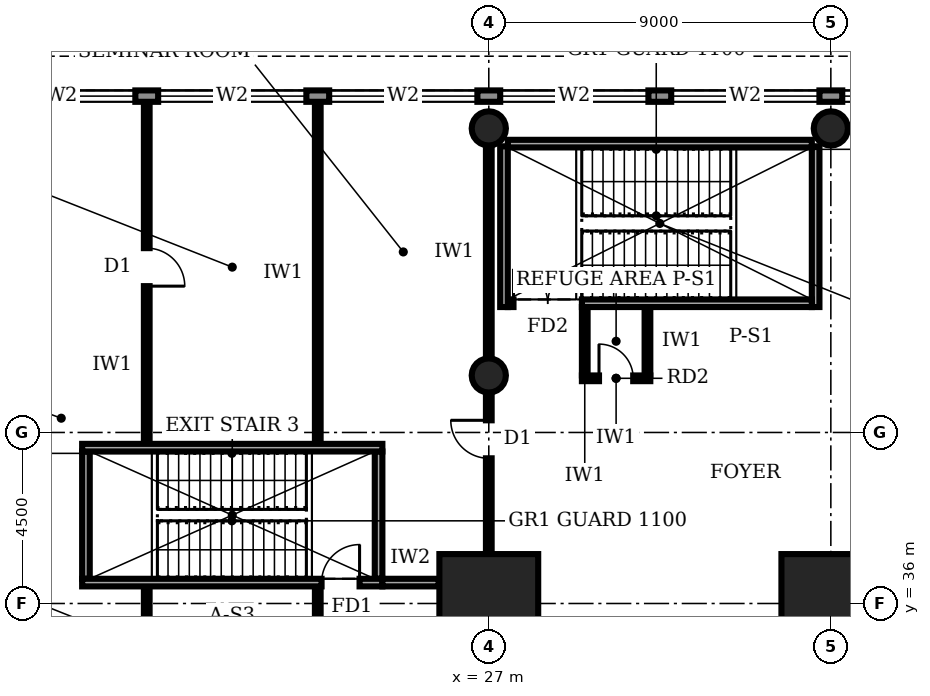
"""IFC4 building model, lengths in metres.
Left out: names, types, materials, properties, quantities, classifications, styles, units other than length and angle.
Written with IfcOpenShell. Run it as: python <this file> out.ifc"""

import sys

from ifc_helpers import new_model, si_unit, direction, frame, frame_2d, origin, origin_2d, place, context, subcontext, project, spatial, rectangle, circle, extrude, element, fill, save


model = new_model("IFC4")
c1 = context("Model", 3, precision=1e-05, world=origin(), true_north=direction((0.0, 1.0)))
c2 = subcontext(c1, "Body", "Model", "MODEL_VIEW")
j1 = project(units=[si_unit("LENGTHUNIT", "METRE"), si_unit("PLANEANGLEUNIT", "RADIAN")], contexts=[c1])
p1 = place(None, origin())
s1 = spatial("IfcSite", under=j1, at=p1, CompositionType="ELEMENT")
p2 = place(p1, origin())
s2 = spatial("IfcBuilding", under=s1, at=p2, CompositionType="ELEMENT")
p3 = place(p2, frame((0.0, 0.0, 6.0)))
s3 = spatial("IfcBuildingStorey", under=s2, at=p3, CompositionType="ELEMENT", Elevation=6.0)
for number, where, z_axis, x_axis in (
    (1, (27.0, 36.0, 0.0), (0.0, 0.0, 1.0), (1.0, 0.0, 0.0)),
    (2, (36.0, 36.0, 0.0), (0.0, 0.0, 1.0), (1.0, 0.0, 0.0)),
):
    element("IfcColumn", number, at=place(p3, frame(where, z_axis=z_axis, x_axis=x_axis)), inside=s3, PredefinedType="COLUMN", context=c2, shape_type="SweptSolid", body=[
        extrude(rectangle(XDim=2.6, YDim=2.6, at=origin_2d()), origin(), (0.0, 0.0, 1.0), 5.0),
    ])
for number, where, z_axis, x_axis in (
    (3, (27.0, 42.0, 0.0), (0.0, 0.0, 1.0), (1.0, 0.0, 0.0)),
    (4, (27.0, 48.5, 0.0), (0.0, 0.0, 1.0), (1.0, 0.0, 0.0)),
    (5, (36.0, 48.5, 0.0), (0.0, 0.0, 1.0), (1.0, 0.0, 0.0)),
):
    element("IfcColumn", number, at=place(p3, frame(where, z_axis=z_axis, x_axis=x_axis)), inside=s3, PredefinedType="COLUMN", context=c2, shape_type="SweptSolid", body=[
        extrude(circle(Radius=0.45, at=origin_2d()), origin(), (0.0, 0.0, 1.0), 5.0),
    ])
p4 = place(p3, frame((98.98, 49.35, 0.0), z_axis=(0.0, 0.0, 1.0), x_axis=(-1.0, 0.0, 0.0)))
e6 = element("IfcWall", 6, at=p4, inside=s3, PredefinedType="STANDARD", context=c2, shape_type="SweptSolid", body=[
    extrude(rectangle(XDim=98.96, YDim=0.3, at=frame_2d((49.48, 0.0))), origin(), (0.0, 0.0, 1.0), 4.7),
])
p5 = place(p4, frame((94.78, 0.0, 0.6)))
e7 = element("IfcOpeningElement", 7, at=p5, cuts=e6, PredefinedType="OPENING", context=c2, shape_type="SweptSolid", body=[
    extrude(rectangle(XDim=3.9, YDim=2.6, at=frame_2d((1.95, 1.3))), frame((0.0, 0.16, 0.0), z_axis=(0.0, -1.0, 0.0), x_axis=(1.0, 0.0, 0.0)), (0.0, 0.0, 1.0), 0.32),
])
p6 = place(p4, frame((90.28, 0.0, 0.6)))
e8 = element("IfcOpeningElement", 8, at=p6, cuts=e6, PredefinedType="OPENING", context=c2, shape_type="SweptSolid", body=[
    extrude(rectangle(XDim=3.9, YDim=2.6, at=frame_2d((1.95, 1.3))), frame((0.0, 0.16, 0.0), z_axis=(0.0, -1.0, 0.0), x_axis=(1.0, 0.0, 0.0)), (0.0, 0.0, 1.0), 0.32),
])
p7 = place(p4, frame((85.78, 0.0, 0.6)))
e9 = element("IfcOpeningElement", 9, at=p7, cuts=e6, PredefinedType="OPENING", context=c2, shape_type="SweptSolid", body=[
    extrude(rectangle(XDim=3.9, YDim=2.6, at=frame_2d((1.95, 1.3))), frame((0.0, 0.16, 0.0), z_axis=(0.0, -1.0, 0.0), x_axis=(1.0, 0.0, 0.0)), (0.0, 0.0, 1.0), 0.32),
])
p8 = place(p4, frame((81.28, 0.0, 0.6)))
e10 = element("IfcOpeningElement", 10, at=p8, cuts=e6, PredefinedType="OPENING", context=c2, shape_type="SweptSolid", body=[
    extrude(rectangle(XDim=3.9, YDim=2.6, at=frame_2d((1.95, 1.3))), frame((0.0, 0.16, 0.0), z_axis=(0.0, -1.0, 0.0), x_axis=(1.0, 0.0, 0.0)), (0.0, 0.0, 1.0), 0.32),
])
p9 = place(p4, frame((76.78, 0.0, 0.6)))
e11 = element("IfcOpeningElement", 11, at=p9, cuts=e6, PredefinedType="OPENING", context=c2, shape_type="SweptSolid", body=[
    extrude(rectangle(XDim=3.9, YDim=2.6, at=frame_2d((1.95, 1.3))), frame((0.0, 0.16, 0.0), z_axis=(0.0, -1.0, 0.0), x_axis=(1.0, 0.0, 0.0)), (0.0, 0.0, 1.0), 0.32),
])
p10 = place(p4, frame((72.28, 0.0, 0.6)))
e12 = element("IfcOpeningElement", 12, at=p10, cuts=e6, PredefinedType="OPENING", context=c2, shape_type="SweptSolid", body=[
    extrude(rectangle(XDim=3.9, YDim=2.6, at=frame_2d((1.95, 1.3))), frame((0.0, 0.16, 0.0), z_axis=(0.0, -1.0, 0.0), x_axis=(1.0, 0.0, 0.0)), (0.0, 0.0, 1.0), 0.32),
])
p11 = place(p4, frame((67.78, 0.0, 0.6)))
e13 = element("IfcOpeningElement", 13, at=p11, cuts=e6, PredefinedType="OPENING", context=c2, shape_type="SweptSolid", body=[
    extrude(rectangle(XDim=3.9, YDim=2.6, at=frame_2d((1.95, 1.3))), frame((0.0, 0.16, 0.0), z_axis=(0.0, -1.0, 0.0), x_axis=(1.0, 0.0, 0.0)), (0.0, 0.0, 1.0), 0.32),
])
p12 = place(p4, frame((63.28, 0.0, 0.6)))
e14 = element("IfcOpeningElement", 14, at=p12, cuts=e6, PredefinedType="OPENING", context=c2, shape_type="SweptSolid", body=[
    extrude(rectangle(XDim=3.9, YDim=2.6, at=frame_2d((1.95, 1.3))), frame((0.0, 0.16, 0.0), z_axis=(0.0, -1.0, 0.0), x_axis=(1.0, 0.0, 0.0)), (0.0, 0.0, 1.0), 0.32),
])
p13 = place(p4, frame((58.78, 0.0, 0.6)))
e15 = element("IfcOpeningElement", 15, at=p13, cuts=e6, PredefinedType="OPENING", context=c2, shape_type="SweptSolid", body=[
    extrude(rectangle(XDim=3.9, YDim=2.6, at=frame_2d((1.95, 1.3))), frame((0.0, 0.16, 0.0), z_axis=(0.0, -1.0, 0.0), x_axis=(1.0, 0.0, 0.0)), (0.0, 0.0, 1.0), 0.32),
])
p14 = place(p4, frame((54.28, 0.0, 0.6)))
e16 = element("IfcOpeningElement", 16, at=p14, cuts=e6, PredefinedType="OPENING", context=c2, shape_type="SweptSolid", body=[
    extrude(rectangle(XDim=3.9, YDim=2.6, at=frame_2d((1.95, 1.3))), frame((0.0, 0.16, 0.0), z_axis=(0.0, -1.0, 0.0), x_axis=(1.0, 0.0, 0.0)), (0.0, 0.0, 1.0), 0.32),
])
p15 = place(p4, frame((49.78, 0.0, 0.6)))
e17 = element("IfcOpeningElement", 17, at=p15, cuts=e6, PredefinedType="OPENING", context=c2, shape_type="SweptSolid", body=[
    extrude(rectangle(XDim=3.9, YDim=2.6, at=frame_2d((1.95, 1.3))), frame((0.0, 0.16, 0.0), z_axis=(0.0, -1.0, 0.0), x_axis=(1.0, 0.0, 0.0)), (0.0, 0.0, 1.0), 0.32),
])
p16 = place(p4, frame((45.28, 0.0, 0.6)))
e18 = element("IfcOpeningElement", 18, at=p16, cuts=e6, PredefinedType="OPENING", context=c2, shape_type="SweptSolid", body=[
    extrude(rectangle(XDim=3.9, YDim=2.6, at=frame_2d((1.95, 1.3))), frame((0.0, 0.16, 0.0), z_axis=(0.0, -1.0, 0.0), x_axis=(1.0, 0.0, 0.0)), (0.0, 0.0, 1.0), 0.32),
])
p17 = place(p4, frame((40.78, 0.0, 0.6)))
e19 = element("IfcOpeningElement", 19, at=p17, cuts=e6, PredefinedType="OPENING", context=c2, shape_type="SweptSolid", body=[
    extrude(rectangle(XDim=3.9, YDim=2.6, at=frame_2d((1.95, 1.3))), frame((0.0, 0.16, 0.0), z_axis=(0.0, -1.0, 0.0), x_axis=(1.0, 0.0, 0.0)), (0.0, 0.0, 1.0), 0.32),
])
p18 = place(p4, frame((36.28, 0.0, 0.6)))
e20 = element("IfcOpeningElement", 20, at=p18, cuts=e6, PredefinedType="OPENING", context=c2, shape_type="SweptSolid", body=[
    extrude(rectangle(XDim=3.9, YDim=2.6, at=frame_2d((1.95, 1.3))), frame((0.0, 0.16, 0.0), z_axis=(0.0, -1.0, 0.0), x_axis=(1.0, 0.0, 0.0)), (0.0, 0.0, 1.0), 0.32),
])
p19 = place(p4, frame((31.78, 0.0, 0.6)))
e21 = element("IfcOpeningElement", 21, at=p19, cuts=e6, PredefinedType="OPENING", context=c2, shape_type="SweptSolid", body=[
    extrude(rectangle(XDim=3.9, YDim=2.6, at=frame_2d((1.95, 1.3))), frame((0.0, 0.16, 0.0), z_axis=(0.0, -1.0, 0.0), x_axis=(1.0, 0.0, 0.0)), (0.0, 0.0, 1.0), 0.32),
])
p20 = place(p4, frame((27.28, 0.0, 0.6)))
e22 = element("IfcOpeningElement", 22, at=p20, cuts=e6, PredefinedType="OPENING", context=c2, shape_type="SweptSolid", body=[
    extrude(rectangle(XDim=3.9, YDim=2.6, at=frame_2d((1.95, 1.3))), frame((0.0, 0.16, 0.0), z_axis=(0.0, -1.0, 0.0), x_axis=(1.0, 0.0, 0.0)), (0.0, 0.0, 1.0), 0.32),
])
p21 = place(p4, frame((22.78, 0.0, 0.6)))
e23 = element("IfcOpeningElement", 23, at=p21, cuts=e6, PredefinedType="OPENING", context=c2, shape_type="SweptSolid", body=[
    extrude(rectangle(XDim=3.9, YDim=2.6, at=frame_2d((1.95, 1.3))), frame((0.0, 0.16, 0.0), z_axis=(0.0, -1.0, 0.0), x_axis=(1.0, 0.0, 0.0)), (0.0, 0.0, 1.0), 0.32),
])
p22 = place(p4, frame((18.28, 0.0, 0.6)))
e24 = element("IfcOpeningElement", 24, at=p22, cuts=e6, PredefinedType="OPENING", context=c2, shape_type="SweptSolid", body=[
    extrude(rectangle(XDim=3.9, YDim=2.6, at=frame_2d((1.95, 1.3))), frame((0.0, 0.16, 0.0), z_axis=(0.0, -1.0, 0.0), x_axis=(1.0, 0.0, 0.0)), (0.0, 0.0, 1.0), 0.32),
])
p23 = place(p4, frame((13.78, 0.0, 0.6)))
e25 = element("IfcOpeningElement", 25, at=p23, cuts=e6, PredefinedType="OPENING", context=c2, shape_type="SweptSolid", body=[
    extrude(rectangle(XDim=3.9, YDim=2.6, at=frame_2d((1.95, 1.3))), frame((0.0, 0.16, 0.0), z_axis=(0.0, -1.0, 0.0), x_axis=(1.0, 0.0, 0.0)), (0.0, 0.0, 1.0), 0.32),
])
p24 = place(p4, frame((9.28, 0.0, 0.6)))
e26 = element("IfcOpeningElement", 26, at=p24, cuts=e6, PredefinedType="OPENING", context=c2, shape_type="SweptSolid", body=[
    extrude(rectangle(XDim=3.9, YDim=2.6, at=frame_2d((1.95, 1.3))), frame((0.0, 0.16, 0.0), z_axis=(0.0, -1.0, 0.0), x_axis=(1.0, 0.0, 0.0)), (0.0, 0.0, 1.0), 0.32),
])
p25 = place(p4, frame((4.78, 0.0, 0.6)))
e27 = element("IfcOpeningElement", 27, at=p25, cuts=e6, PredefinedType="OPENING", context=c2, shape_type="SweptSolid", body=[
    extrude(rectangle(XDim=3.9, YDim=2.6, at=frame_2d((1.95, 1.3))), frame((0.0, 0.16, 0.0), z_axis=(0.0, -1.0, 0.0), x_axis=(1.0, 0.0, 0.0)), (0.0, 0.0, 1.0), 0.32),
])
p26 = place(p3, frame((18.0, 31.5, 0.0), z_axis=(0.0, 0.0, 1.0), x_axis=(0.0, 1.0, 0.0)))
e28 = element("IfcWall", 28, at=p26, inside=s3, PredefinedType="PARTITIONING", context=c2, shape_type="SweptSolid", body=[
    extrude(rectangle(XDim=4.95, YDim=0.15, at=frame_2d((2.475, 0.0))), origin(), (0.0, 0.0, 1.0), 4.7),
])
p27 = place(p3, frame((18.0, 40.2, 0.0), z_axis=(0.0, 0.0, 1.0), x_axis=(0.0, 1.0, 0.0)))
e29 = element("IfcWall", 29, at=p27, inside=s3, PredefinedType="PARTITIONING", context=c2, shape_type="SweptSolid", body=[
    extrude(rectangle(XDim=9.0, YDim=0.15, at=frame_2d((4.5, 0.0))), origin(), (0.0, 0.0, 1.0), 4.7),
])
p28 = place(p27, frame((4.15, 0.0, 0.0)))
e30 = element("IfcOpeningElement", 30, at=p28, cuts=e29, PredefinedType="OPENING", context=c2, shape_type="SweptSolid", body=[
    extrude(rectangle(XDim=1.0, YDim=2.1, at=frame_2d((0.5, 1.05))), frame((0.0, 0.085, 0.0), z_axis=(0.0, -1.0, 0.0), x_axis=(1.0, 0.0, 0.0)), (0.0, 0.0, 1.0), 0.17),
])
p29 = place(p3, frame((22.5, 31.5, 0.0), z_axis=(0.0, 0.0, 1.0), x_axis=(0.0, 1.0, 0.0)))
e31 = element("IfcWall", 31, at=p29, inside=s3, PredefinedType="PARTITIONING", context=c2, shape_type="SweptSolid", body=[
    extrude(rectangle(XDim=4.95, YDim=0.15, at=frame_2d((2.475, 0.0))), origin(), (0.0, 0.0, 1.0), 4.7),
])
p30 = place(p3, frame((22.5, 40.2, 0.0), z_axis=(0.0, 0.0, 1.0), x_axis=(0.0, 1.0, 0.0)))
e32 = element("IfcWall", 32, at=p30, inside=s3, PredefinedType="PARTITIONING", context=c2, shape_type="SweptSolid", body=[
    extrude(rectangle(XDim=9.0, YDim=0.15, at=frame_2d((4.5, 0.0))), origin(), (0.0, 0.0, 1.0), 4.7),
])
p31 = place(p3, frame((27.0, 37.32, 0.0), z_axis=(0.0, 0.0, 1.0), x_axis=(0.0, 1.0, 0.0)))
e33 = element("IfcWall", 33, at=p31, inside=s3, PredefinedType="PARTITIONING", context=c2, shape_type="SweptSolid", body=[
    extrude(rectangle(XDim=4.21, YDim=0.15, at=frame_2d((2.105, 0.0))), origin(), (0.0, 0.0, 1.0), 3.7),
])
p32 = place(p31, frame((2.5, 0.0, 0.0)))
e34 = element("IfcOpeningElement", 34, at=p32, cuts=e33, PredefinedType="OPENING", context=c2, shape_type="SweptSolid", body=[
    extrude(rectangle(XDim=1.0, YDim=2.1, at=frame_2d((0.5, 1.05))), frame((0.0, 0.085, 0.0), z_axis=(0.0, -1.0, 0.0), x_axis=(1.0, 0.0, 0.0)), (0.0, 0.0, 1.0), 0.17),
])
p33 = place(p3, frame((27.0, 42.47, 0.0), z_axis=(0.0, 0.0, 1.0), x_axis=(0.0, 1.0, 0.0)))
e35 = element("IfcWall", 35, at=p33, inside=s3, PredefinedType="PARTITIONING", context=c2, shape_type="SweptSolid", body=[
    extrude(rectangle(XDim=5.56, YDim=0.15, at=frame_2d((2.78, 0.0))), origin(), (0.0, 0.0, 1.0), 3.7),
])
p34 = place(p3, frame((27.5, 43.9, 0.0), z_axis=(0.0, 0.0, 1.0), x_axis=(1.0, 0.0, 0.0)))
e36 = element("IfcWall", 36, at=p34, inside=s3, PredefinedType="SOLIDWALL", context=c2, shape_type="SweptSolid", body=[
    extrude(rectangle(XDim=8.0, YDim=0.2, at=frame_2d((4.0, 0.0))), origin(), (0.0, 0.0, 1.0), 4.7),
])
p35 = place(p34, frame((0.15, 0.0, 0.0)))
e37 = element("IfcOpeningElement", 37, at=p35, cuts=e36, PredefinedType="OPENING", context=c2, shape_type="SweptSolid", body=[
    extrude(rectangle(XDim=1.8, YDim=2.1, at=frame_2d((0.9, 1.05))), frame((0.0, 0.11, 0.0), z_axis=(0.0, -1.0, 0.0), x_axis=(1.0, 0.0, 0.0)), (0.0, 0.0, 1.0), 0.22),
])
p36 = place(p3, frame((27.5, 48.1, 0.0), z_axis=(0.0, 0.0, 1.0), x_axis=(1.0, 0.0, 0.0)))
e38 = element("IfcWall", 38, at=p36, inside=s3, PredefinedType="SOLIDWALL", context=c2, shape_type="SweptSolid", body=[
    extrude(rectangle(XDim=8.0, YDim=0.2, at=frame_2d((4.0, 0.0))), origin(), (0.0, 0.0, 1.0), 4.7),
])
for number, where, z_axis, x_axis in (
    (39, (27.4, 43.8, 0.0), (0.0, 0.0, 1.0), (0.0, 1.0, 0.0)),
    (40, (35.6, 43.8, 0.0), (0.0, 0.0, 1.0), (0.0, 1.0, 0.0)),
):
    element("IfcWall", number, at=place(p3, frame(where, z_axis=z_axis, x_axis=x_axis)), inside=s3, PredefinedType="SOLIDWALL", context=c2, shape_type="SweptSolid", body=[
        extrude(rectangle(XDim=4.23, YDim=0.2, at=frame_2d((2.115, 0.0))), origin(), (0.0, 0.0, 1.0), 4.7),
    ])
p37 = place(p3, frame((24.2, 36.55, 0.0), z_axis=(0.0, 0.0, 1.0), x_axis=(1.0, 0.0, 0.0)))
e41 = element("IfcWall", 41, at=p37, inside=s3, PredefinedType="SOLIDWALL", context=c2, shape_type="SweptSolid", body=[
    extrude(rectangle(XDim=1.48, YDim=0.2, at=frame_2d((0.74, 0.0))), origin(), (0.0, 0.0, 1.0), 4.7),
])
p38 = place(p3, frame((16.3, 36.55, 0.0), z_axis=(0.0, 0.0, 1.0), x_axis=(1.0, 0.0, 0.0)))
e42 = element("IfcWall", 42, at=p38, inside=s3, PredefinedType="SOLIDWALL", context=c2, shape_type="SweptSolid", body=[
    extrude(rectangle(XDim=7.9, YDim=0.2, at=frame_2d((3.95, 0.0))), origin(), (0.0, 0.0, 1.0), 4.7),
])
p39 = place(p38, frame((6.3, 0.0, 0.0)))
e43 = element("IfcOpeningElement", 43, at=p39, cuts=e42, PredefinedType="OPENING", context=c2, shape_type="SweptSolid", body=[
    extrude(rectangle(XDim=1.0, YDim=2.1, at=frame_2d((0.5, 1.05))), frame((0.0, 0.11, 0.0), z_axis=(0.0, -1.0, 0.0), x_axis=(1.0, 0.0, 0.0)), (0.0, 0.0, 1.0), 0.22),
])
p40 = place(p3, frame((16.3, 40.1, 0.0), z_axis=(0.0, 0.0, 1.0), x_axis=(1.0, 0.0, 0.0)))
e44 = element("IfcWall", 44, at=p40, inside=s3, PredefinedType="SOLIDWALL", context=c2, shape_type="SweptSolid", body=[
    extrude(rectangle(XDim=7.9, YDim=0.2, at=frame_2d((3.95, 0.0))), origin(), (0.0, 0.0, 1.0), 4.7),
])
for number, where, z_axis, x_axis in (
    (45, (16.4, 36.65, 0.0), (0.0, 0.0, 1.0), (0.0, 1.0, 0.0)),
    (46, (24.1, 36.65, 0.0), (0.0, 0.0, 1.0), (0.0, 1.0, 0.0)),
):
    element("IfcWall", number, at=place(p3, frame(where, z_axis=z_axis, x_axis=x_axis)), inside=s3, PredefinedType="SOLIDWALL", context=c2, shape_type="SweptSolid", body=[
        extrude(rectangle(XDim=3.35, YDim=0.2, at=frame_2d((1.675, 0.0))), origin(), (0.0, 0.0, 1.0), 4.7),
    ])
p41 = place(p3, frame((31.175, 42.0, 0.0), z_axis=(0.0, 0.0, 1.0), x_axis=(0.0, 1.0, 0.0)))
e47 = element("IfcWall", 47, at=p41, inside=s3, PredefinedType="PARTITIONING", context=c2, shape_type="SweptSolid", body=[
    extrude(rectangle(XDim=1.8, YDim=0.15, at=frame_2d((0.9, 0.0))), origin(), (0.0, 0.0, 1.0), 4.7),
])
p42 = place(p3, frame((29.45, 41.925, 0.0), z_axis=(0.0, 0.0, 1.0), x_axis=(1.0, 0.0, 0.0)))
e48 = element("IfcWall", 48, at=p42, inside=s3, PredefinedType="PARTITIONING", context=c2, shape_type="SweptSolid", body=[
    extrude(rectangle(XDim=1.8, YDim=0.15, at=frame_2d((0.9, 0.0))), origin(), (0.0, 0.0, 1.0), 4.7),
])
p43 = place(p42, frame((0.45, 0.0, 0.0)))
e49 = element("IfcOpeningElement", 49, at=p43, cuts=e48, PredefinedType="OPENING", context=c2, shape_type="SweptSolid", body=[
    extrude(rectangle(XDim=0.9, YDim=2.1, at=frame_2d((0.45, 1.05))), frame((0.0, 0.085, 0.0), z_axis=(0.0, -1.0, 0.0), x_axis=(1.0, 0.0, 0.0)), (0.0, 0.0, 1.0), 0.17),
])
p44 = place(p3, frame((29.525, 42.0, 0.0), z_axis=(0.0, 0.0, 1.0), x_axis=(0.0, 1.0, 0.0)))
e50 = element("IfcWall", 50, at=p44, inside=s3, PredefinedType="PARTITIONING", context=c2, shape_type="SweptSolid", body=[
    extrude(rectangle(XDim=1.8, YDim=0.15, at=frame_2d((0.9, 0.0))), origin(), (0.0, 0.0, 1.0), 4.7),
])
p45 = place(p8, origin())
e51 = element("IfcWindow", 51, at=p45, inside=s3, PartitioningType="SINGLE_PANEL", PredefinedType="WINDOW", context=c2, shape_type="SweptSolid", body=[
    extrude(rectangle(XDim=3.9, YDim=2.6, at=frame_2d((1.95, 1.3))), frame((0.0, 0.03, 0.0), z_axis=(0.0, -1.0, 0.0), x_axis=(1.0, 0.0, 0.0)), (0.0, 0.0, 1.0), 0.06),
])
fill(e10, e51)
p46 = place(p9, origin())
e52 = element("IfcWindow", 52, at=p46, inside=s3, PartitioningType="SINGLE_PANEL", PredefinedType="WINDOW", context=c2, shape_type="SweptSolid", body=[
    extrude(rectangle(XDim=3.9, YDim=2.6, at=frame_2d((1.95, 1.3))), frame((0.0, 0.03, 0.0), z_axis=(0.0, -1.0, 0.0), x_axis=(1.0, 0.0, 0.0)), (0.0, 0.0, 1.0), 0.06),
])
fill(e11, e52)
p47 = place(p10, origin())
e53 = element("IfcWindow", 53, at=p47, inside=s3, PartitioningType="SINGLE_PANEL", PredefinedType="WINDOW", context=c2, shape_type="SweptSolid", body=[
    extrude(rectangle(XDim=3.9, YDim=2.6, at=frame_2d((1.95, 1.3))), frame((0.0, 0.03, 0.0), z_axis=(0.0, -1.0, 0.0), x_axis=(1.0, 0.0, 0.0)), (0.0, 0.0, 1.0), 0.06),
])
fill(e12, e53)
p48 = place(p11, origin())
e54 = element("IfcWindow", 54, at=p48, inside=s3, PartitioningType="SINGLE_PANEL", PredefinedType="WINDOW", context=c2, shape_type="SweptSolid", body=[
    extrude(rectangle(XDim=3.9, YDim=2.6, at=frame_2d((1.95, 1.3))), frame((0.0, 0.03, 0.0), z_axis=(0.0, -1.0, 0.0), x_axis=(1.0, 0.0, 0.0)), (0.0, 0.0, 1.0), 0.06),
])
fill(e13, e54)
p49 = place(p12, origin())
e55 = element("IfcWindow", 55, at=p49, inside=s3, PartitioningType="SINGLE_PANEL", PredefinedType="WINDOW", context=c2, shape_type="SweptSolid", body=[
    extrude(rectangle(XDim=3.9, YDim=2.6, at=frame_2d((1.95, 1.3))), frame((0.0, 0.03, 0.0), z_axis=(0.0, -1.0, 0.0), x_axis=(1.0, 0.0, 0.0)), (0.0, 0.0, 1.0), 0.06),
])
fill(e14, e55)
p50 = place(p13, origin())
e56 = element("IfcWindow", 56, at=p50, inside=s3, PartitioningType="SINGLE_PANEL", PredefinedType="WINDOW", context=c2, shape_type="SweptSolid", body=[
    extrude(rectangle(XDim=3.9, YDim=2.6, at=frame_2d((1.95, 1.3))), frame((0.0, 0.03, 0.0), z_axis=(0.0, -1.0, 0.0), x_axis=(1.0, 0.0, 0.0)), (0.0, 0.0, 1.0), 0.06),
])
fill(e15, e56)
p51 = place(p28, frame((1.0, 0.0, 0.0), z_axis=(0.0, 0.0, 1.0), x_axis=(-1.0, 0.0, 0.0)))
e57 = element("IfcDoor", 57, at=p51, inside=s3, OperationType="SINGLE_SWING_RIGHT", PredefinedType="DOOR", context=c2, shape_type="SweptSolid", body=[
    extrude(rectangle(XDim=1.0, YDim=2.1, at=frame_2d((0.5, 1.05))), frame((0.0, 0.025, 0.0), z_axis=(0.0, -1.0, 0.0), x_axis=(1.0, 0.0, 0.0)), (0.0, 0.0, 1.0), 0.05),
])
fill(e30, e57)
p52 = place(p32, origin())
e58 = element("IfcDoor", 58, at=p52, inside=s3, OperationType="SINGLE_SWING_RIGHT", PredefinedType="DOOR", context=c2, shape_type="SweptSolid", body=[
    extrude(rectangle(XDim=1.0, YDim=2.1, at=frame_2d((0.5, 1.05))), frame((0.0, 0.025, 0.0), z_axis=(0.0, -1.0, 0.0), x_axis=(1.0, 0.0, 0.0)), (0.0, 0.0, 1.0), 0.05),
])
fill(e34, e58)
p53 = place(p35, origin())
e59 = element("IfcDoor", 59, at=p53, inside=s3, OperationType="DOUBLE_DOOR_SINGLE_SWING", PredefinedType="DOOR", context=c2, shape_type="SweptSolid", body=[
    extrude(rectangle(XDim=1.8, YDim=2.1, at=frame_2d((0.9, 1.05))), frame((0.0, 0.025, 0.0), z_axis=(0.0, -1.0, 0.0), x_axis=(1.0, 0.0, 0.0)), (0.0, 0.0, 1.0), 0.05),
])
fill(e37, e59)
p54 = place(p39, origin())
e60 = element("IfcDoor", 60, at=p54, inside=s3, OperationType="SINGLE_SWING_RIGHT", PredefinedType="DOOR", context=c2, shape_type="SweptSolid", body=[
    extrude(rectangle(XDim=1.0, YDim=2.1, at=frame_2d((0.5, 1.05))), frame((0.0, 0.025, 0.0), z_axis=(0.0, -1.0, 0.0), x_axis=(1.0, 0.0, 0.0)), (0.0, 0.0, 1.0), 0.05),
])
fill(e43, e60)
p55 = place(p43, origin())
e61 = element("IfcDoor", 61, at=p55, inside=s3, OperationType="SINGLE_SWING_LEFT", PredefinedType="DOOR", context=c2, shape_type="SweptSolid", body=[
    extrude(rectangle(XDim=0.9, YDim=2.1, at=frame_2d((0.45, 1.05))), frame((0.0, 0.025, 0.0), z_axis=(0.0, -1.0, 0.0), x_axis=(1.0, 0.0, 0.0)), (0.0, 0.0, 1.0), 0.05),
])
fill(e49, e61)
save(model, sys.argv[1])
